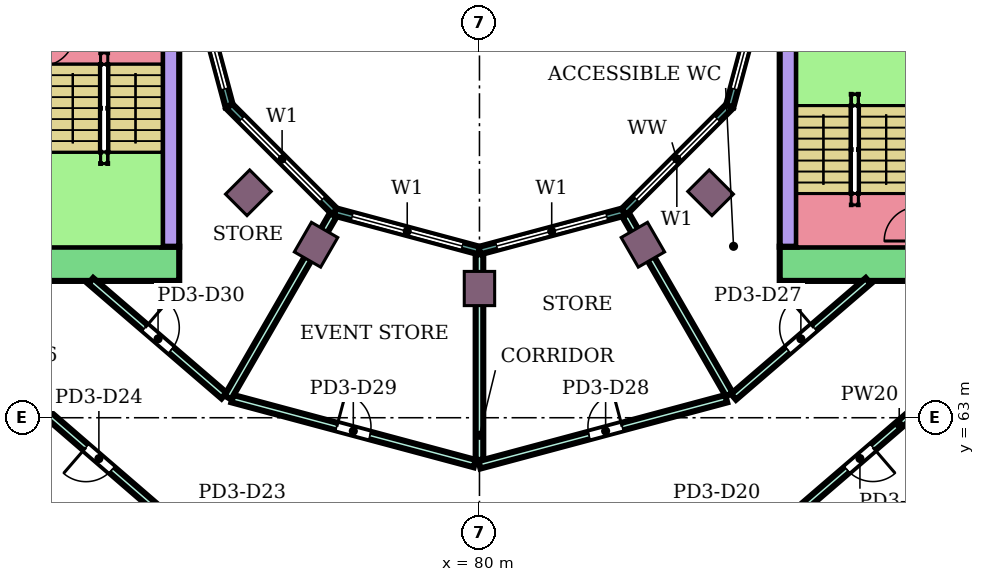
"""IFC4 building model, lengths in metres.
Left out: names, types, materials, properties, quantities, classifications, styles, units other than length and angle.
Written with IfcOpenShell. Run it as: python <this file> out.ifc"""

import sys

from ifc_helpers import new_model, si_unit, direction, frame, frame_2d, origin, origin_2d, place, context, subcontext, project, spatial, rectangle, extrude, element, fill, save


model = new_model("IFC4")
c1 = context("Model", 3, precision=1e-05, world=origin(), true_north=direction((0.0, 1.0)))
c2 = subcontext(c1, "Body", "Model", "MODEL_VIEW")
j1 = project(units=[si_unit("LENGTHUNIT", "METRE"), si_unit("PLANEANGLEUNIT", "RADIAN")], contexts=[c1])
p1 = place(None, origin())
s1 = spatial("IfcSite", under=j1, at=p1, CompositionType="ELEMENT")
p2 = place(p1, origin())
s2 = spatial("IfcBuilding", under=s1, at=p2, CompositionType="ELEMENT")
p3 = place(p2, frame((0.0, 0.0, 17.8)))
s3 = spatial("IfcBuildingStorey", under=s2, at=p3, CompositionType="ELEMENT", Elevation=17.8)
for number, where, z_axis, x_axis in (
    (1, (73.919, 68.919, 0.0), (0.0, 0.0, 1.0), (-0.707, -0.707, 0.0)),
    (2, (75.7, 67.552, 0.0), (0.0, 0.0, 1.0), (-0.5, -0.866, 0.0)),
    (3, (80.0, 66.4, 0.0), (0.0, 0.0, 1.0), (0.0, -1.0, 0.0)),
    (4, (84.3, 67.552, 0.0), (0.0, 0.0, 1.0), (0.5, -0.866, 0.0)),
    (5, (86.081, 68.919, 0.0), (0.0, 0.0, 1.0), (0.707, -0.707, 0.0)),
):
    element("IfcColumn", number, at=place(p3, frame(where, z_axis=z_axis, x_axis=x_axis)), inside=s3, PredefinedType="COLUMN", context=c2, shape_type="SweptSolid", body=[
        extrude(rectangle(XDim=0.9, YDim=0.8, at=origin_2d()), origin(), (0.0, 0.0, 1.0), 6.0),
    ])
p4 = place(p3, frame((87.9, 67.05, 0.0), z_axis=(0.0, 0.0, 1.0), x_axis=(1.0, 0.0, 0.0)))
e6 = element("IfcWall", 6, at=p4, inside=s3, PredefinedType="SHEAR", context=c2, shape_type="SweptSolid", body=[
    extrude(rectangle(XDim=14.6, YDim=0.9, at=frame_2d((7.3, 0.0))), origin(), (0.0, 0.0, 1.0), 5.55),
])
p5 = place(p4, frame((4.2, 0.0, 0.0)))
e7 = element("IfcOpeningElement", 7, at=p5, cuts=e6, PredefinedType="OPENING", context=c2, shape_type="SweptSolid", body=[
    extrude(rectangle(XDim=2.4, YDim=2.4, at=frame_2d((1.2, 1.2))), frame((0.0, 0.46, 0.0), z_axis=(0.0, -1.0, 0.0), x_axis=(1.0, 0.0, 0.0)), (0.0, 0.0, 1.0), 0.92),
])
p6 = place(p3, frame((88.125, 67.5, 0.0), z_axis=(0.0, 0.0, 1.0), x_axis=(0.0, 1.0, 0.0)))
e8 = element("IfcWall", 8, at=p6, inside=s3, PredefinedType="SHEAR", context=c2, shape_type="SweptSolid", body=[
    extrude(rectangle(XDim=7.5, YDim=0.45, at=frame_2d((3.75, 0.0))), origin(), (0.0, 0.0, 1.0), 5.55),
])
p7 = place(p3, frame((72.1, 67.05, 0.0), z_axis=(0.0, 0.0, 1.0), x_axis=(-1.0, 0.0, 0.0)))
e9 = element("IfcWall", 9, at=p7, inside=s3, PredefinedType="SHEAR", context=c2, shape_type="SweptSolid", body=[
    extrude(rectangle(XDim=14.6, YDim=0.9, at=frame_2d((7.3, 0.0))), origin(), (0.0, 0.0, 1.0), 5.55),
])
p8 = place(p7, frame((4.2, 0.0, 0.0)))
e10 = element("IfcOpeningElement", 10, at=p8, cuts=e9, PredefinedType="OPENING", context=c2, shape_type="SweptSolid", body=[
    extrude(rectangle(XDim=2.4, YDim=2.4, at=frame_2d((1.2, 1.2))), frame((0.0, 0.46, 0.0), z_axis=(0.0, -1.0, 0.0), x_axis=(1.0, 0.0, 0.0)), (0.0, 0.0, 1.0), 0.92),
])
p9 = place(p3, frame((71.875, 75.0, 0.0), z_axis=(0.0, 0.0, 1.0), x_axis=(0.0, -1.0, 0.0)))
e11 = element("IfcWall", 11, at=p9, inside=s3, PredefinedType="SHEAR", context=c2, shape_type="SweptSolid", body=[
    extrude(rectangle(XDim=7.5, YDim=0.45, at=frame_2d((3.75, 0.0))), origin(), (0.0, 0.0, 1.0), 5.55),
])
p10 = place(p3, frame((72.396, 75.0, 0.0), z_axis=(0.0, 0.0, 1.0), x_axis=(0.258789828301, -0.965933654434, 0.0)))
e12 = element("IfcWall", 12, at=p10, inside=s3, PredefinedType="NOTDEFINED", context=c2, shape_type="SweptSolid", body=[
    extrude(rectangle(XDim=3.936, YDim=0.2, at=frame_2d((1.968, 0.0))), origin(), (0.0, 0.0, 1.0), 6.0),
])
p11 = place(p10, frame((0.468, 0.0, 0.9)))
e13 = element("IfcOpeningElement", 13, at=p11, cuts=e12, PredefinedType="OPENING", context=c2, shape_type="SweptSolid", body=[
    extrude(rectangle(XDim=3.0, YDim=2.3, at=frame_2d((1.5, 1.15))), frame((0.0, 0.11, 0.0), z_axis=(0.0, -1.0, 0.0), x_axis=(1.0, 0.0, 0.0)), (0.0, 0.0, 1.0), 0.22),
])
p12 = place(p3, frame((73.415, 71.198, 0.0), z_axis=(0.0, 0.0, 1.0), x_axis=(0.707106781187, -0.707106781187, 0.0)))
e14 = element("IfcWall", 14, at=p12, inside=s3, PredefinedType="NOTDEFINED", context=c2, shape_type="SweptSolid", body=[
    extrude(rectangle(XDim=3.936, YDim=0.2, at=frame_2d((1.968, 0.0))), origin(), (0.0, 0.0, 1.0), 6.0),
])
p13 = place(p12, frame((0.468, 0.0, 0.9)))
e15 = element("IfcOpeningElement", 15, at=p13, cuts=e14, PredefinedType="OPENING", context=c2, shape_type="SweptSolid", body=[
    extrude(rectangle(XDim=3.0, YDim=2.3, at=frame_2d((1.5, 1.15))), frame((0.0, 0.11, 0.0), z_axis=(0.0, -1.0, 0.0), x_axis=(1.0, 0.0, 0.0)), (0.0, 0.0, 1.0), 0.22),
])
p14 = place(p3, frame((76.198, 68.415, 0.0), z_axis=(0.0, 0.0, 1.0), x_axis=(0.965933654434, -0.258789828301, 0.0)))
e16 = element("IfcWall", 16, at=p14, inside=s3, PredefinedType="NOTDEFINED", context=c2, shape_type="SweptSolid", body=[
    extrude(rectangle(XDim=3.936, YDim=0.2, at=frame_2d((1.968, 0.0))), origin(), (0.0, 0.0, 1.0), 6.0),
])
p15 = place(p14, frame((0.468, 0.0, 0.9)))
e17 = element("IfcOpeningElement", 17, at=p15, cuts=e16, PredefinedType="OPENING", context=c2, shape_type="SweptSolid", body=[
    extrude(rectangle(XDim=3.0, YDim=2.3, at=frame_2d((1.5, 1.15))), frame((0.0, 0.11, 0.0), z_axis=(0.0, -1.0, 0.0), x_axis=(1.0, 0.0, 0.0)), (0.0, 0.0, 1.0), 0.22),
])
p16 = place(p3, frame((80.0, 67.396, 0.0), z_axis=(0.0, 0.0, 1.0), x_axis=(0.965933654434, 0.258789828301, 0.0)))
e18 = element("IfcWall", 18, at=p16, inside=s3, PredefinedType="NOTDEFINED", context=c2, shape_type="SweptSolid", body=[
    extrude(rectangle(XDim=3.936, YDim=0.2, at=frame_2d((1.968, 0.0))), origin(), (0.0, 0.0, 1.0), 6.0),
])
p17 = place(p16, frame((0.468, 0.0, 0.9)))
e19 = element("IfcOpeningElement", 19, at=p17, cuts=e18, PredefinedType="OPENING", context=c2, shape_type="SweptSolid", body=[
    extrude(rectangle(XDim=3.0, YDim=2.3, at=frame_2d((1.5, 1.15))), frame((0.0, 0.11, 0.0), z_axis=(0.0, -1.0, 0.0), x_axis=(1.0, 0.0, 0.0)), (0.0, 0.0, 1.0), 0.22),
])
p18 = place(p3, frame((83.802, 68.415, 0.0), z_axis=(0.0, 0.0, 1.0), x_axis=(0.707106781187, 0.707106781187, 0.0)))
e20 = element("IfcWall", 20, at=p18, inside=s3, PredefinedType="NOTDEFINED", context=c2, shape_type="SweptSolid", body=[
    extrude(rectangle(XDim=3.936, YDim=0.2, at=frame_2d((1.968, 0.0))), origin(), (0.0, 0.0, 1.0), 6.0),
])
p19 = place(p18, frame((0.468, 0.0, 0.9)))
e21 = element("IfcOpeningElement", 21, at=p19, cuts=e20, PredefinedType="OPENING", context=c2, shape_type="SweptSolid", body=[
    extrude(rectangle(XDim=3.0, YDim=2.3, at=frame_2d((1.5, 1.15))), frame((0.0, 0.11, 0.0), z_axis=(0.0, -1.0, 0.0), x_axis=(1.0, 0.0, 0.0)), (0.0, 0.0, 1.0), 0.22),
])
p20 = place(p3, frame((86.585, 71.198, 0.0), z_axis=(0.0, 0.0, 1.0), x_axis=(0.258789828301, 0.965933654434, 0.0)))
e22 = element("IfcWall", 22, at=p20, inside=s3, PredefinedType="NOTDEFINED", context=c2, shape_type="SweptSolid", body=[
    extrude(rectangle(XDim=3.936, YDim=0.2, at=frame_2d((1.968, 0.0))), origin(), (0.0, 0.0, 1.0), 6.0),
])
p21 = place(p20, frame((0.468, 0.0, 0.9)))
e23 = element("IfcOpeningElement", 23, at=p21, cuts=e22, PredefinedType="OPENING", context=c2, shape_type="SweptSolid", body=[
    extrude(rectangle(XDim=3.0, YDim=2.3, at=frame_2d((1.5, 1.15))), frame((0.0, 0.11, 0.0), z_axis=(0.0, -1.0, 0.0), x_axis=(1.0, 0.0, 0.0)), (0.0, 0.0, 1.0), 0.22),
])
p22 = place(p3, frame((66.304, 65.102, 0.0), z_axis=(0.0, 0.0, 1.0), x_axis=(0.75695048542, -0.653472235541, 0.0)))
e24 = element("IfcWall", 24, at=p22, inside=s3, PredefinedType="PARTITIONING", context=c2, shape_type="SweptSolid", body=[
    extrude(rectangle(XDim=7.062, YDim=0.2, at=frame_2d((3.531, 0.0))), origin(), (0.0, 0.0, 1.0), 5.55),
])
p23 = place(p22, frame((4.414, 0.0, 0.0)))
e25 = element("IfcOpeningElement", 25, at=p23, cuts=e24, PredefinedType="OPENING", context=c2, shape_type="SweptSolid", body=[
    extrude(rectangle(XDim=0.9, YDim=2.1, at=frame_2d((0.45, 1.05))), frame((0.0, 0.11, 0.0), z_axis=(0.0, -1.0, 0.0), x_axis=(1.0, 0.0, 0.0)), (0.0, 0.0, 1.0), 0.22),
])
p24 = place(p22, frame((1.08, 0.0, 0.0)))
e26 = element("IfcOpeningElement", 26, at=p24, cuts=e24, PredefinedType="OPENING", context=c2, shape_type="SweptSolid", body=[
    extrude(rectangle(XDim=0.9, YDim=2.1, at=frame_2d((0.45, 1.05))), frame((0.0, 0.11, 0.0), z_axis=(0.0, -1.0, 0.0), x_axis=(1.0, 0.0, 0.0)), (0.0, 0.0, 1.0), 0.22),
])
p25 = place(p3, frame((69.771, 66.6, 0.0), z_axis=(0.0, 0.0, 1.0), x_axis=(0.758040611529, -0.652207352974, 0.0)))
e27 = element("IfcWall", 27, at=p25, inside=s3, PredefinedType="PARTITIONING", context=c2, shape_type="SweptSolid", body=[
    extrude(rectangle(XDim=4.625, YDim=0.2, at=frame_2d((2.312, 0.0))), origin(), (0.0, 0.0, 1.0), 5.55),
])
p26 = place(p25, frame((1.887, 0.0, 0.0)))
e28 = element("IfcOpeningElement", 28, at=p26, cuts=e27, PredefinedType="OPENING", context=c2, shape_type="SweptSolid", body=[
    extrude(rectangle(XDim=0.9, YDim=2.1, at=frame_2d((0.45, 1.05))), frame((0.0, 0.11, 0.0), z_axis=(0.0, -1.0, 0.0), x_axis=(1.0, 0.0, 0.0)), (0.0, 0.0, 1.0), 0.22),
])
p27 = place(p3, frame((73.499, 63.502, 0.0), z_axis=(0.0, 0.0, 1.0), x_axis=(0.965923617359, -0.258827288799, 0.0)))
e29 = element("IfcWall", 29, at=p27, inside=s3, PredefinedType="PARTITIONING", context=c2, shape_type="SweptSolid", body=[
    extrude(rectangle(XDim=6.601, YDim=0.2, at=frame_2d((3.3, 0.0))), origin(), (0.0, 0.0, 1.0), 5.55),
])
p28 = place(p27, frame((2.844, 0.0, 0.0)))
e30 = element("IfcOpeningElement", 30, at=p28, cuts=e29, PredefinedType="OPENING", context=c2, shape_type="SweptSolid", body=[
    extrude(rectangle(XDim=0.9, YDim=2.1, at=frame_2d((0.45, 1.05))), frame((0.0, 0.11, 0.0), z_axis=(0.0, -1.0, 0.0), x_axis=(1.0, 0.0, 0.0)), (0.0, 0.0, 1.0), 0.22),
])
p29 = place(p3, frame((73.379, 63.534, 0.0), z_axis=(0.0, 0.0, 1.0), x_axis=(0.500052970826, 0.865994818904, 0.0)))
e31 = element("IfcWall", 31, at=p29, inside=s3, PredefinedType="PARTITIONING", context=c2, shape_type="SweptSolid", body=[
    extrude(rectangle(XDim=5.542, YDim=0.2, at=frame_2d((2.771, 0.0))), origin(), (0.0, 0.0, 1.0), 5.55),
])
p30 = place(p3, frame((80.0, 61.89, 0.0), z_axis=(0.0, 0.0, 1.0), x_axis=(0.0, 1.0, 0.0)))
e32 = element("IfcWall", 32, at=p30, inside=s3, PredefinedType="PARTITIONING", context=c2, shape_type="SweptSolid", body=[
    extrude(rectangle(XDim=5.411, YDim=0.2, at=frame_2d((2.706, 0.0))), origin(), (0.0, 0.0, 1.0), 5.55),
])
p31 = place(p3, frame((80.0, 61.76, 0.0), z_axis=(0.0, 0.0, 1.0), x_axis=(0.965932810031, 0.258792980017, 0.0)))
e33 = element("IfcWall", 33, at=p31, inside=s3, PredefinedType="PARTITIONING", context=c2, shape_type="SweptSolid", body=[
    extrude(rectangle(XDim=6.721, YDim=0.2, at=frame_2d((3.36, 0.0))), origin(), (0.0, 0.0, 1.0), 5.55),
])
p32 = place(p31, frame((2.987, 0.0, 0.0)))
e34 = element("IfcOpeningElement", 34, at=p32, cuts=e33, PredefinedType="OPENING", context=c2, shape_type="SweptSolid", body=[
    extrude(rectangle(XDim=0.9, YDim=2.1, at=frame_2d((0.45, 1.05))), frame((0.0, 0.11, 0.0), z_axis=(0.0, -1.0, 0.0), x_axis=(1.0, 0.0, 0.0)), (0.0, 0.0, 1.0), 0.22),
])
p33 = place(p3, frame((83.848, 68.333, 0.0), z_axis=(0.0, 0.0, 1.0), x_axis=(0.49997314572, -0.866040907555, 0.0)))
e35 = element("IfcWall", 35, at=p33, inside=s3, PredefinedType="PARTITIONING", context=c2, shape_type="SweptSolid", body=[
    extrude(rectangle(XDim=5.451, YDim=0.2, at=frame_2d((2.726, 0.0))), origin(), (0.0, 0.0, 1.0), 5.55),
])
p34 = place(p3, frame((86.685, 63.551, 0.0), z_axis=(0.0, 0.0, 1.0), x_axis=(0.758049900748, 0.652196556244, 0.0)))
e36 = element("IfcWall", 36, at=p34, inside=s3, PredefinedType="PARTITIONING", context=c2, shape_type="SweptSolid", body=[
    extrude(rectangle(XDim=4.675, YDim=0.2, at=frame_2d((2.337, 0.0))), origin(), (0.0, 0.0, 1.0), 5.55),
])
p35 = place(p34, frame((1.887, 0.0, 0.0)))
e37 = element("IfcOpeningElement", 37, at=p35, cuts=e36, PredefinedType="OPENING", context=c2, shape_type="SweptSolid", body=[
    extrude(rectangle(XDim=0.9, YDim=2.1, at=frame_2d((0.45, 1.05))), frame((0.0, 0.11, 0.0), z_axis=(0.0, -1.0, 0.0), x_axis=(1.0, 0.0, 0.0)), (0.0, 0.0, 1.0), 0.22),
])
p36 = place(p3, frame((88.436, 60.573, 0.0), z_axis=(0.0, 0.0, 1.0), x_axis=(0.758186248639, 0.652038045189, 0.0)))
e38 = element("IfcWall", 38, at=p36, inside=s3, PredefinedType="PARTITIONING", context=c2, shape_type="SweptSolid", body=[
    extrude(rectangle(XDim=6.882, YDim=0.2, at=frame_2d((3.441, 0.0))), origin(), (0.0, 0.0, 1.0), 5.55),
])
p37 = place(p36, frame((4.941, 0.0, 0.0)))
e39 = element("IfcOpeningElement", 39, at=p37, cuts=e38, PredefinedType="OPENING", context=c2, shape_type="SweptSolid", body=[
    extrude(rectangle(XDim=0.9, YDim=2.1, at=frame_2d((0.45, 1.05))), frame((0.0, 0.11, 0.0), z_axis=(0.0, -1.0, 0.0), x_axis=(1.0, 0.0, 0.0)), (0.0, 0.0, 1.0), 0.22),
])
p38 = place(p36, frame((1.627, 0.0, 0.0)))
e40 = element("IfcOpeningElement", 40, at=p38, cuts=e38, PredefinedType="OPENING", context=c2, shape_type="SweptSolid", body=[
    extrude(rectangle(XDim=0.9, YDim=2.1, at=frame_2d((0.45, 1.05))), frame((0.0, 0.11, 0.0), z_axis=(0.0, -1.0, 0.0), x_axis=(1.0, 0.0, 0.0)), (0.0, 0.0, 1.0), 0.22),
])
p39 = place(p11, origin())
e41 = element("IfcWindow", 41, at=p39, inside=s3, PartitioningType="SINGLE_PANEL", PredefinedType="WINDOW", context=c2, shape_type="SweptSolid", body=[
    extrude(rectangle(XDim=3.0, YDim=2.3, at=frame_2d((1.5, 1.15))), frame((0.0, 0.03, 0.0), z_axis=(0.0, -1.0, 0.0), x_axis=(1.0, 0.0, 0.0)), (0.0, 0.0, 1.0), 0.06),
])
fill(e13, e41)
p40 = place(p13, origin())
e42 = element("IfcWindow", 42, at=p40, inside=s3, PartitioningType="SINGLE_PANEL", PredefinedType="WINDOW", context=c2, shape_type="SweptSolid", body=[
    extrude(rectangle(XDim=3.0, YDim=2.3, at=frame_2d((1.5, 1.15))), frame((0.0, 0.03, 0.0), z_axis=(0.0, -1.0, 0.0), x_axis=(1.0, 0.0, 0.0)), (0.0, 0.0, 1.0), 0.06),
])
fill(e15, e42)
p41 = place(p15, origin())
e43 = element("IfcWindow", 43, at=p41, inside=s3, PartitioningType="SINGLE_PANEL", PredefinedType="WINDOW", context=c2, shape_type="SweptSolid", body=[
    extrude(rectangle(XDim=3.0, YDim=2.3, at=frame_2d((1.5, 1.15))), frame((0.0, 0.03, 0.0), z_axis=(0.0, -1.0, 0.0), x_axis=(1.0, 0.0, 0.0)), (0.0, 0.0, 1.0), 0.06),
])
fill(e17, e43)
p42 = place(p17, origin())
e44 = element("IfcWindow", 44, at=p42, inside=s3, PartitioningType="SINGLE_PANEL", PredefinedType="WINDOW", context=c2, shape_type="SweptSolid", body=[
    extrude(rectangle(XDim=3.0, YDim=2.3, at=frame_2d((1.5, 1.15))), frame((0.0, 0.03, 0.0), z_axis=(0.0, -1.0, 0.0), x_axis=(1.0, 0.0, 0.0)), (0.0, 0.0, 1.0), 0.06),
])
fill(e19, e44)
p43 = place(p19, origin())
e45 = element("IfcWindow", 45, at=p43, inside=s3, PartitioningType="SINGLE_PANEL", PredefinedType="WINDOW", context=c2, shape_type="SweptSolid", body=[
    extrude(rectangle(XDim=3.0, YDim=2.3, at=frame_2d((1.5, 1.15))), frame((0.0, 0.03, 0.0), z_axis=(0.0, -1.0, 0.0), x_axis=(1.0, 0.0, 0.0)), (0.0, 0.0, 1.0), 0.06),
])
fill(e21, e45)
p44 = place(p21, origin())
e46 = element("IfcWindow", 46, at=p44, inside=s3, PartitioningType="SINGLE_PANEL", PredefinedType="WINDOW", context=c2, shape_type="SweptSolid", body=[
    extrude(rectangle(XDim=3.0, YDim=2.3, at=frame_2d((1.5, 1.15))), frame((0.0, 0.03, 0.0), z_axis=(0.0, -1.0, 0.0), x_axis=(1.0, 0.0, 0.0)), (0.0, 0.0, 1.0), 0.06),
])
fill(e23, e46)
p45 = place(p38, frame((0.9, 0.0, 0.0), z_axis=(0.0, 0.0, 1.0), x_axis=(-1.0, 0.0, 0.0)))
e47 = element("IfcDoor", 47, at=p45, inside=s3, OperationType="SINGLE_SWING_LEFT", PredefinedType="DOOR", context=c2, shape_type="SweptSolid", body=[
    extrude(rectangle(XDim=0.9, YDim=2.1, at=frame_2d((0.45, 1.05))), frame((0.0, 0.025, 0.0), z_axis=(0.0, -1.0, 0.0), x_axis=(1.0, 0.0, 0.0)), (0.0, 0.0, 1.0), 0.05),
])
fill(e40, e47)
p46 = place(p23, frame((0.9, 0.0, 0.0), z_axis=(0.0, 0.0, 1.0), x_axis=(-1.0, 0.0, 0.0)))
e48 = element("IfcDoor", 48, at=p46, inside=s3, OperationType="SINGLE_SWING_RIGHT", PredefinedType="DOOR", context=c2, shape_type="SweptSolid", body=[
    extrude(rectangle(XDim=0.9, YDim=2.1, at=frame_2d((0.45, 1.05))), frame((0.0, 0.025, 0.0), z_axis=(0.0, -1.0, 0.0), x_axis=(1.0, 0.0, 0.0)), (0.0, 0.0, 1.0), 0.05),
])
fill(e25, e48)
p47 = place(p35, origin())
e49 = element("IfcDoor", 49, at=p47, inside=s3, OperationType="SINGLE_SWING_RIGHT", PredefinedType="DOOR", context=c2, shape_type="SweptSolid", body=[
    extrude(rectangle(XDim=0.9, YDim=2.1, at=frame_2d((0.45, 1.05))), frame((0.0, 0.025, 0.0), z_axis=(0.0, -1.0, 0.0), x_axis=(1.0, 0.0, 0.0)), (0.0, 0.0, 1.0), 0.05),
])
fill(e37, e49)
p48 = place(p32, origin())
e50 = element("IfcDoor", 50, at=p48, inside=s3, OperationType="SINGLE_SWING_RIGHT", PredefinedType="DOOR", context=c2, shape_type="SweptSolid", body=[
    extrude(rectangle(XDim=0.9, YDim=2.1, at=frame_2d((0.45, 1.05))), frame((0.0, 0.025, 0.0), z_axis=(0.0, -1.0, 0.0), x_axis=(1.0, 0.0, 0.0)), (0.0, 0.0, 1.0), 0.05),
])
fill(e34, e50)
p49 = place(p28, origin())
e51 = element("IfcDoor", 51, at=p49, inside=s3, OperationType="SINGLE_SWING_LEFT", PredefinedType="DOOR", context=c2, shape_type="SweptSolid", body=[
    extrude(rectangle(XDim=0.9, YDim=2.1, at=frame_2d((0.45, 1.05))), frame((0.0, 0.025, 0.0), z_axis=(0.0, -1.0, 0.0), x_axis=(1.0, 0.0, 0.0)), (0.0, 0.0, 1.0), 0.05),
])
fill(e30, e51)
p50 = place(p26, origin())
e52 = element("IfcDoor", 52, at=p50, inside=s3, OperationType="SINGLE_SWING_LEFT", PredefinedType="DOOR", context=c2, shape_type="SweptSolid", body=[
    extrude(rectangle(XDim=0.9, YDim=2.1, at=frame_2d((0.45, 1.05))), frame((0.0, 0.025, 0.0), z_axis=(0.0, -1.0, 0.0), x_axis=(1.0, 0.0, 0.0)), (0.0, 0.0, 1.0), 0.05),
])
fill(e28, e52)
save(model, sys.argv[1])
